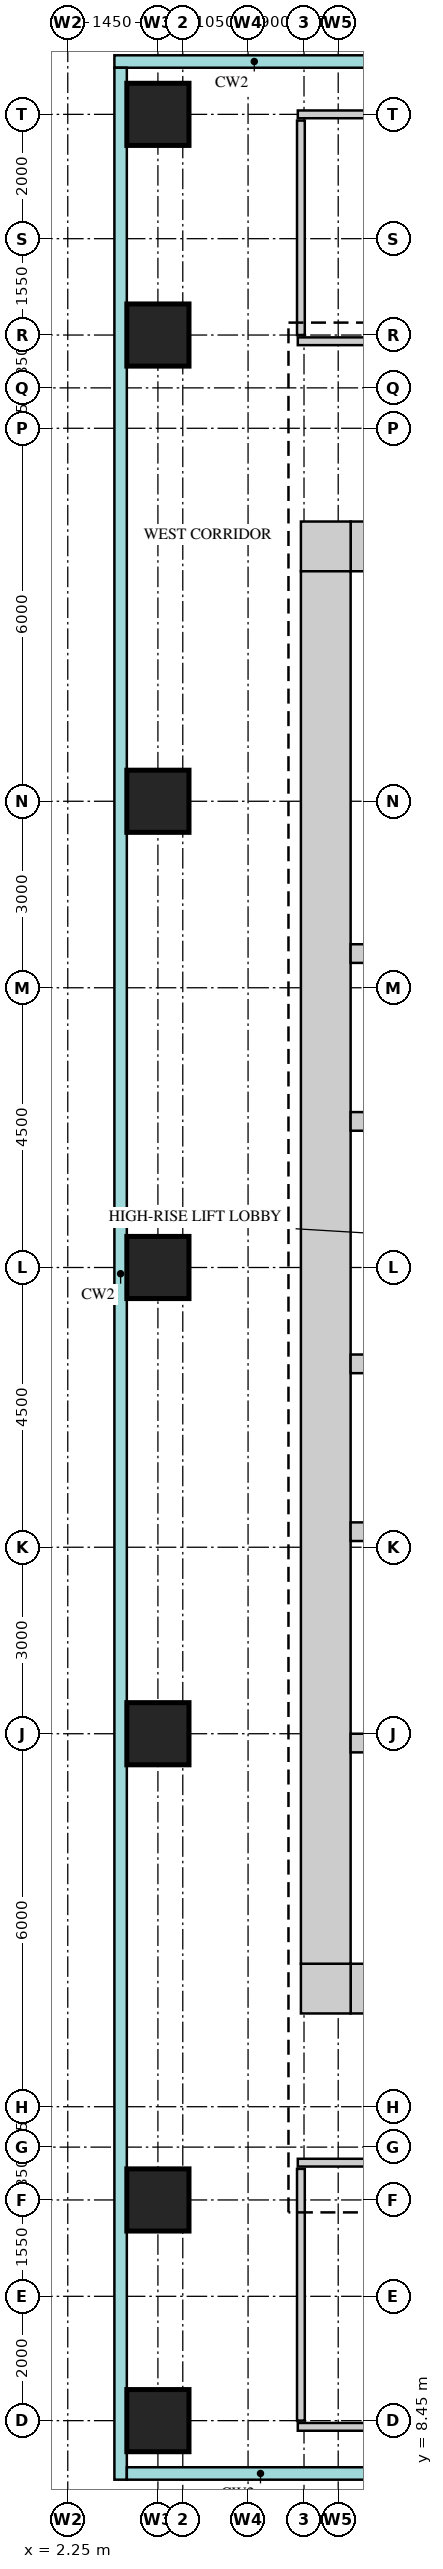
"""IFC4 building model, lengths in metres.
Left out: names, types, materials, properties, quantities, classifications, styles, units other than length and angle.
Written with IfcOpenShell. Run it as: python <this file> out.ifc"""

import sys

from ifc_helpers import new_model, si_unit, direction, frame, frame_2d, origin, origin_2d, place, context, subcontext, project, spatial, rectangle, extrude, source, transform, mapped, element, save


model = new_model("IFC4")
c1 = context("Model", 3, precision=1e-05, world=origin(), true_north=direction((0.0, 1.0)))
c2 = subcontext(c1, "Body", "Model", "MODEL_VIEW")
j1 = project(units=[si_unit("LENGTHUNIT", "METRE"), si_unit("PLANEANGLEUNIT", "RADIAN")], contexts=[c1])
p1 = place(None, origin())
s1 = spatial("IfcSite", under=j1, at=p1, CompositionType="ELEMENT")
p2 = place(p1, origin())
s2 = spatial("IfcBuilding", under=s1, at=p2, CompositionType="ELEMENT")
p3 = place(p2, frame((0.0, 0.0, 204.7)))
s3 = spatial("IfcBuildingStorey", under=s2, at=p3, CompositionType="ELEMENT", Elevation=204.7)
m1 = source(origin(), c2, "Body", "SweptSolid", [
    extrude(rectangle(XDim=13.4, YDim=0.8, at=frame_2d((6.7, 0.0))), origin(), (0.0, 0.0, 1.0), 3.75),
])
p4 = place(p3, frame((6.8, 38.6, 0.0), z_axis=(0.0, 0.0, 1.0), x_axis=(1.0, 0.0, 0.0)))
e1 = element("IfcWall", 1, at=p4, inside=s3, PredefinedType="SHEAR", context=c2, shape_type="MappedRepresentation", body=[
    mapped(m1, transform((0.0, 0.0, 0.0))),
])
m2 = source(origin(), c2, "Body", "SweptSolid", [
    extrude(rectangle(XDim=0.9, YDim=2.1, at=frame_2d((0.45, 1.05))), frame((0.0, 0.41, 0.0), z_axis=(0.0, -1.0, 0.0), x_axis=(1.0, 0.0, 0.0)), (0.0, 0.0, 1.0), 0.82),
])
p5 = place(p4, frame((1.8, 0.0, 0.0)))
e2 = element("IfcOpeningElement", 2, at=p5, cuts=e1, PredefinedType="OPENING", context=c2, shape_type="MappedRepresentation", body=[
    mapped(m2, transform((0.0, 0.0, 0.0))),
])
p6 = place(p4, frame((6.25, 0.0, 0.0)))
e3 = element("IfcOpeningElement", 3, at=p6, cuts=e1, PredefinedType="OPENING", context=c2, shape_type="MappedRepresentation", body=[
    mapped(m2, transform((0.0, 0.0, 0.0))),
])
p7 = place(p4, frame((10.7, 0.0, 0.0)))
e4 = element("IfcOpeningElement", 4, at=p7, cuts=e1, PredefinedType="OPENING", context=c2, shape_type="MappedRepresentation", body=[
    mapped(m2, transform((0.0, 0.0, 0.0))),
])
m3 = source(origin(), c2, "Body", "SweptSolid", [
    extrude(rectangle(XDim=0.8, YDim=0.8, at=frame_2d((0.4, 0.0))), origin(), (0.0, 0.0, 1.0), 3.75),
])
p8 = place(p3, frame((6.0, 38.6, 0.0), z_axis=(0.0, 0.0, 1.0), x_axis=(1.0, 0.0, 0.0)))
e5 = element("IfcWall", 5, at=p8, inside=s3, PredefinedType="SHEAR", context=c2, shape_type="MappedRepresentation", body=[
    mapped(m3, transform((0.0, 0.0, 0.0))),
])
p9 = place(p3, frame((6.8, 15.4, 0.0), z_axis=(0.0, 0.0, 1.0), x_axis=(1.0, 0.0, 0.0)))
e6 = element("IfcWall", 6, at=p9, inside=s3, PredefinedType="SHEAR", context=c2, shape_type="MappedRepresentation", body=[
    mapped(m1, transform((0.0, 0.0, 0.0))),
])
m4 = source(origin(), c2, "Body", "SweptSolid", [
    extrude(rectangle(XDim=1.2, YDim=2.1, at=frame_2d((0.6, 1.05))), frame((0.0, 0.41, 0.0), z_axis=(0.0, -1.0, 0.0), x_axis=(1.0, 0.0, 0.0)), (0.0, 0.0, 1.0), 0.82),
])
p10 = place(p9, frame((5.4, 0.0, 0.0)))
e7 = element("IfcOpeningElement", 7, at=p10, cuts=e6, PredefinedType="OPENING", context=c2, shape_type="MappedRepresentation", body=[
    mapped(m4, transform((0.0, 0.0, 0.0))),
])
p11 = place(p9, frame((2.05, 0.0, 0.0)))
e8 = element("IfcOpeningElement", 8, at=p11, cuts=e6, PredefinedType="OPENING", context=c2, shape_type="MappedRepresentation", body=[
    mapped(m4, transform((0.0, 0.0, 0.0))),
])
m5 = source(origin(), c2, "Body", "SweptSolid", [
    extrude(rectangle(XDim=1.0, YDim=2.1, at=frame_2d((0.5, 1.05))), frame((0.0, 0.41, 0.0), z_axis=(0.0, -1.0, 0.0), x_axis=(1.0, 0.0, 0.0)), (0.0, 0.0, 1.0), 0.82),
])
p12 = place(p9, frame((7.9, 0.0, 0.0)))
e9 = element("IfcOpeningElement", 9, at=p12, cuts=e6, PredefinedType="OPENING", context=c2, shape_type="MappedRepresentation", body=[
    mapped(m5, transform((0.0, 0.0, 0.0))),
])
p13 = place(p3, frame((6.0, 15.4, 0.0), z_axis=(0.0, 0.0, 1.0), x_axis=(1.0, 0.0, 0.0)))
e10 = element("IfcWall", 10, at=p13, inside=s3, PredefinedType="SHEAR", context=c2, shape_type="MappedRepresentation", body=[
    mapped(m3, transform((0.0, 0.0, 0.0))),
])
m6 = source(origin(), c2, "Body", "SweptSolid", [
    extrude(rectangle(XDim=22.4, YDim=0.8, at=frame_2d((11.2, 0.0))), origin(), (0.0, 0.0, 1.0), 3.75),
])
p14 = place(p3, frame((6.4, 15.8, 0.0), z_axis=(0.0, 0.0, 1.0), x_axis=(0.0, 1.0, 0.0)))
e11 = element("IfcWall", 11, at=p14, inside=s3, PredefinedType="SHEAR", context=c2, shape_type="MappedRepresentation", body=[
    mapped(m6, transform((0.0, 0.0, 0.0))),
])
m7 = source(origin(), c2, "Body", "SweptSolid", [
    extrude(rectangle(XDim=13.4, YDim=0.3, at=frame_2d((6.7, 0.0))), origin(), (0.0, 0.0, 1.0), 3.75),
])
p15 = place(p3, frame((6.8, 22.75, 0.0), z_axis=(0.0, 0.0, 1.0), x_axis=(1.0, 0.0, 0.0)))
e12 = element("IfcWall", 12, at=p15, inside=s3, PredefinedType="STANDARD", context=c2, shape_type="MappedRepresentation", body=[
    mapped(m7, transform((0.0, 0.0, 0.0))),
])
m8 = source(origin(), c2, "Body", "SweptSolid", [
    extrude(rectangle(XDim=9.275, YDim=0.3, at=frame_2d((4.637, 0.0))), origin(), (0.0, 0.0, 1.0), 3.75),
])
p16 = place(p3, frame((6.8, 19.35, 0.0), z_axis=(0.0, 0.0, 1.0), x_axis=(1.0, 0.0, 0.0)))
e13 = element("IfcWall", 13, at=p16, inside=s3, PredefinedType="STANDARD", context=c2, shape_type="MappedRepresentation", body=[
    mapped(m8, transform((0.0, 0.0, 0.0))),
])
m9 = source(origin(), c2, "Body", "SweptSolid", [
    extrude(rectangle(XDim=1.2, YDim=2.1, at=frame_2d((0.6, 1.05))), frame((0.0, 0.16, 0.0), z_axis=(0.0, -1.0, 0.0), x_axis=(1.0, 0.0, 0.0)), (0.0, 0.0, 1.0), 0.32),
])
p17 = place(p16, frame((0.85, 0.0, 0.0)))
e14 = element("IfcOpeningElement", 14, at=p17, cuts=e13, PredefinedType="OPENING", context=c2, shape_type="MappedRepresentation", body=[
    mapped(m9, transform((0.0, 0.0, 0.0))),
])
p18 = place(p16, frame((3.2, 0.0, 0.0)))
e15 = element("IfcOpeningElement", 15, at=p18, cuts=e13, PredefinedType="OPENING", context=c2, shape_type="MappedRepresentation", body=[
    mapped(m9, transform((0.0, 0.0, 0.0))),
])
p19 = place(p16, frame((5.45, 0.0, 0.0)))
e16 = element("IfcOpeningElement", 16, at=p19, cuts=e13, PredefinedType="OPENING", context=c2, shape_type="MappedRepresentation", body=[
    mapped(m9, transform((0.0, 0.0, 0.0))),
])
p20 = place(p16, frame((7.6, 0.0, 0.0)))
e17 = element("IfcOpeningElement", 17, at=p20, cuts=e13, PredefinedType="OPENING", context=c2, shape_type="MappedRepresentation", body=[
    mapped(m9, transform((0.0, 0.0, 0.0))),
])
p21 = place(p3, frame((6.8, 32.05, 0.0), z_axis=(0.0, 0.0, 1.0), x_axis=(1.0, 0.0, 0.0)))
e18 = element("IfcWall", 18, at=p21, inside=s3, PredefinedType="STANDARD", context=c2, shape_type="MappedRepresentation", body=[
    mapped(m7, transform((0.0, 0.0, 0.0))),
])
p22 = place(p3, frame((6.8, 29.35, 0.0), z_axis=(0.0, 0.0, 1.0), x_axis=(1.0, 0.0, 0.0)))
e19 = element("IfcWall", 19, at=p22, inside=s3, PredefinedType="STANDARD", context=c2, shape_type="MappedRepresentation", body=[
    mapped(m7, transform((0.0, 0.0, 0.0))),
])
p23 = place(p22, frame((0.95, 0.0, 0.0)))
e20 = element("IfcOpeningElement", 20, at=p23, cuts=e19, PredefinedType="OPENING", context=c2, shape_type="MappedRepresentation", body=[
    mapped(m9, transform((0.0, 0.0, 0.0))),
])
p24 = place(p22, frame((3.5, 0.0, 0.0)))
e21 = element("IfcOpeningElement", 21, at=p24, cuts=e19, PredefinedType="OPENING", context=c2, shape_type="MappedRepresentation", body=[
    mapped(m9, transform((0.0, 0.0, 0.0))),
])
p25 = place(p22, frame((6.05, 0.0, 0.0)))
e22 = element("IfcOpeningElement", 22, at=p25, cuts=e19, PredefinedType="OPENING", context=c2, shape_type="MappedRepresentation", body=[
    mapped(m9, transform((0.0, 0.0, 0.0))),
])
p26 = place(p22, frame((8.6, 0.0, 0.0)))
e23 = element("IfcOpeningElement", 23, at=p26, cuts=e19, PredefinedType="OPENING", context=c2, shape_type="MappedRepresentation", body=[
    mapped(m9, transform((0.0, 0.0, 0.0))),
])
p27 = place(p22, frame((11.15, 0.0, 0.0)))
e24 = element("IfcOpeningElement", 24, at=p27, cuts=e19, PredefinedType="OPENING", context=c2, shape_type="MappedRepresentation", body=[
    mapped(m9, transform((0.0, 0.0, 0.0))),
])
p28 = place(p3, frame((6.8, 25.45, 0.0), z_axis=(0.0, 0.0, 1.0), x_axis=(1.0, 0.0, 0.0)))
e25 = element("IfcWall", 25, at=p28, inside=s3, PredefinedType="STANDARD", context=c2, shape_type="MappedRepresentation", body=[
    mapped(m7, transform((0.0, 0.0, 0.0))),
])
p29 = place(p28, frame((0.95, 0.0, 0.0)))
e26 = element("IfcOpeningElement", 26, at=p29, cuts=e25, PredefinedType="OPENING", context=c2, shape_type="MappedRepresentation", body=[
    mapped(m9, transform((0.0, 0.0, 0.0))),
])
p30 = place(p28, frame((3.5, 0.0, 0.0)))
e27 = element("IfcOpeningElement", 27, at=p30, cuts=e25, PredefinedType="OPENING", context=c2, shape_type="MappedRepresentation", body=[
    mapped(m9, transform((0.0, 0.0, 0.0))),
])
p31 = place(p28, frame((6.05, 0.0, 0.0)))
e28 = element("IfcOpeningElement", 28, at=p31, cuts=e25, PredefinedType="OPENING", context=c2, shape_type="MappedRepresentation", body=[
    mapped(m9, transform((0.0, 0.0, 0.0))),
])
p32 = place(p28, frame((8.6, 0.0, 0.0)))
e29 = element("IfcOpeningElement", 29, at=p32, cuts=e25, PredefinedType="OPENING", context=c2, shape_type="MappedRepresentation", body=[
    mapped(m9, transform((0.0, 0.0, 0.0))),
])
p33 = place(p28, frame((11.15, 0.0, 0.0)))
e30 = element("IfcOpeningElement", 30, at=p33, cuts=e25, PredefinedType="OPENING", context=c2, shape_type="MappedRepresentation", body=[
    mapped(m9, transform((0.0, 0.0, 0.0))),
])
m10 = source(origin(), c2, "Body", "SweptSolid", [
    extrude(rectangle(XDim=1.0, YDim=1.0, at=origin_2d()), origin(), (0.0, 0.0, 1.0), 3.75),
])
for number, where, z_axis, x_axis in (
    (31, (3.7, 8.45, 0.0), (0.0, 0.0, 1.0), (1.0, 0.0, 0.0)),
    (32, (3.7, 12.0, 0.0), (0.0, 0.0, 1.0), (1.0, 0.0, 0.0)),
    (33, (3.7, 19.5, 0.0), (0.0, 0.0, 1.0), (1.0, 0.0, 0.0)),
    (34, (3.7, 27.0, 0.0), (0.0, 0.0, 1.0), (1.0, 0.0, 0.0)),
    (35, (3.7, 34.5, 0.0), (0.0, 0.0, 1.0), (1.0, 0.0, 0.0)),
    (36, (3.7, 42.0, 0.0), (0.0, 0.0, 1.0), (1.0, 0.0, 0.0)),
    (37, (3.7, 45.55, 0.0), (0.0, 0.0, 1.0), (1.0, 0.0, 0.0)),
):
    element("IfcColumn", number, at=place(p3, frame(where, z_axis=z_axis, x_axis=x_axis)), inside=s3, PredefinedType="COLUMN", context=c2, shape_type="MappedRepresentation", body=[
        mapped(m10, transform((0.0, 0.0, 0.0))),
    ])
m11 = source(origin(), c2, "Body", "SweptSolid", [
    extrude(rectangle(XDim=7.95, YDim=0.125, at=frame_2d((3.975, 0.0))), origin(), (0.0, 0.0, 1.0), 3.25),
])
p34 = place(p3, frame((5.95, 8.35, 0.0), z_axis=(0.0, 0.0, 1.0), x_axis=(1.0, 0.0, 0.0)))
e38 = element("IfcWall", 38, at=p34, inside=s3, PredefinedType="PARTITIONING", context=c2, shape_type="MappedRepresentation", body=[
    mapped(m11, transform((0.0, 0.0, 0.0))),
])
m12 = source(origin(), c2, "Body", "SweptSolid", [
    extrude(rectangle(XDim=0.9, YDim=2.1, at=frame_2d((0.45, 1.05))), frame((0.0, 0.073, 0.0), z_axis=(0.0, -1.0, 0.0), x_axis=(1.0, 0.0, 0.0)), (0.0, 0.0, 1.0), 0.145),
])
p35 = place(p34, frame((3.8, 0.0, 0.0)))
e39 = element("IfcOpeningElement", 39, at=p35, cuts=e38, PredefinedType="OPENING", context=c2, shape_type="MappedRepresentation", body=[
    mapped(m12, transform((0.0, 0.0, 0.0))),
])
m13 = source(origin(), c2, "Body", "SweptSolid", [
    extrude(rectangle(XDim=4.05, YDim=0.125, at=frame_2d((2.025, 0.0))), origin(), (0.0, 0.0, 1.0), 3.8),
])
p36 = place(p3, frame((6.0, 8.45, 0.0), z_axis=(0.0, 0.0, 1.0), x_axis=(0.0, 1.0, 0.0)))
e40 = element("IfcWall", 40, at=p36, inside=s3, PredefinedType="PARTITIONING", context=c2, shape_type="MappedRepresentation", body=[
    mapped(m13, transform((0.0, 0.0, 0.0))),
])
m14 = source(origin(), c2, "Body", "SweptSolid", [
    extrude(rectangle(XDim=8.0, YDim=0.125, at=frame_2d((4.0, 0.0))), origin(), (0.0, 0.0, 1.0), 3.8),
])
p37 = place(p3, frame((5.95, 12.6, 0.0), z_axis=(0.0, 0.0, 1.0), x_axis=(1.0, 0.0, 0.0)))
e41 = element("IfcWall", 41, at=p37, inside=s3, PredefinedType="PARTITIONING", context=c2, shape_type="MappedRepresentation", body=[
    mapped(m14, transform((0.0, 0.0, 0.0))),
])
m15 = source(origin(), c2, "Body", "SweptSolid", [
    extrude(rectangle(XDim=7.95, YDim=0.125, at=frame_2d((3.975, 0.0))), origin(), (0.0, 0.0, 1.0), 3.8),
])
p38 = place(p3, frame((5.95, 41.9, 0.0), z_axis=(0.0, 0.0, 1.0), x_axis=(1.0, 0.0, 0.0)))
e42 = element("IfcWall", 42, at=p38, inside=s3, PredefinedType="PARTITIONING", context=c2, shape_type="MappedRepresentation", body=[
    mapped(m15, transform((0.0, 0.0, 0.0))),
])
p39 = place(p38, frame((3.55, 0.0, 0.0)))
e43 = element("IfcOpeningElement", 43, at=p39, cuts=e42, PredefinedType="OPENING", context=c2, shape_type="MappedRepresentation", body=[
    mapped(m12, transform((0.0, 0.0, 0.0))),
])
m16 = source(origin(), c2, "Body", "SweptSolid", [
    extrude(rectangle(XDim=3.45, YDim=0.125, at=frame_2d((1.725, 0.0))), origin(), (0.0, 0.0, 1.0), 3.8),
])
p40 = place(p3, frame((6.0, 42.0, 0.0), z_axis=(0.0, 0.0, 1.0), x_axis=(0.0, 1.0, 0.0)))
e44 = element("IfcWall", 44, at=p40, inside=s3, PredefinedType="PARTITIONING", context=c2, shape_type="MappedRepresentation", body=[
    mapped(m16, transform((0.0, 0.0, 0.0))),
])
p41 = place(p3, frame((5.95, 45.55, 0.0), z_axis=(0.0, 0.0, 1.0), x_axis=(1.0, 0.0, 0.0)))
e45 = element("IfcWall", 45, at=p41, inside=s3, PredefinedType="PARTITIONING", context=c2, shape_type="MappedRepresentation", body=[
    mapped(m11, transform((0.0, 0.0, 0.0))),
])
save(model, sys.argv[1])
